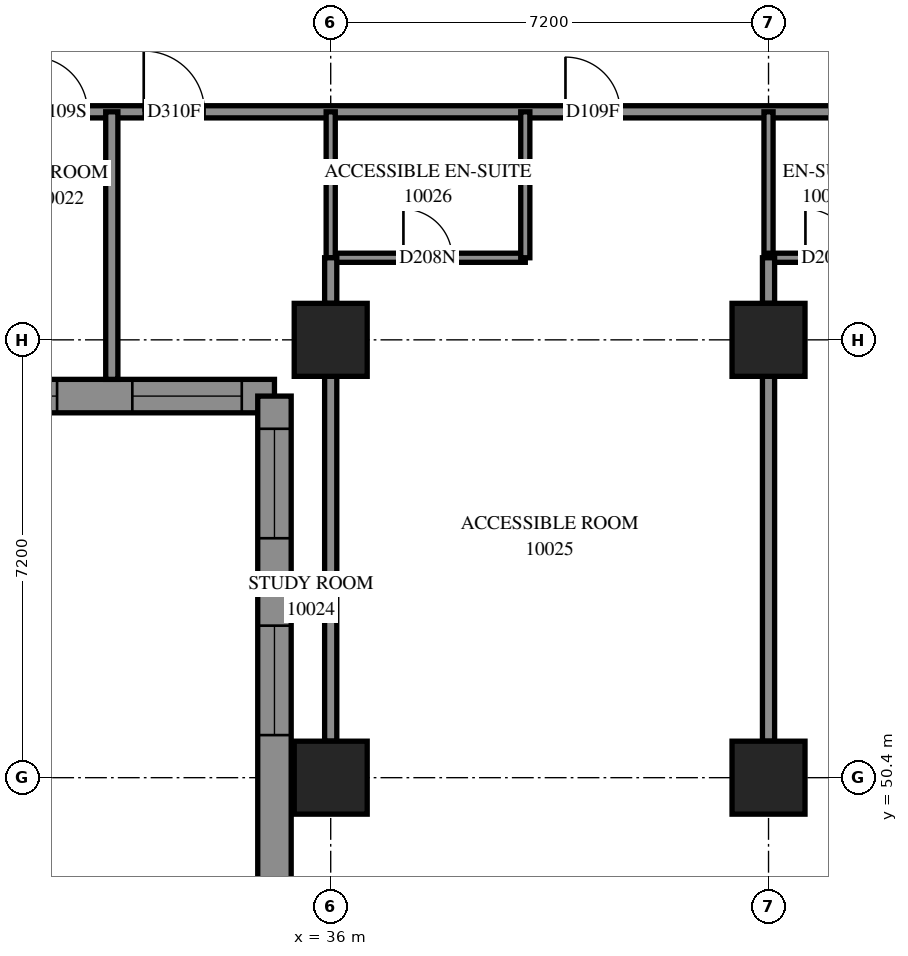
"""IFC4 building model, lengths in metres.
Left out: names, types, materials, properties, quantities, classifications, styles, units other than length and angle.
Written with IfcOpenShell. Run it as: python <this file> out.ifc"""

import sys

from ifc_helpers import new_model, si_unit, direction, frame, frame_2d, origin, origin_2d, place, context, subcontext, project, spatial, polyline, rectangle, outline, extrude, element, fill, save


model = new_model("IFC4")
c1 = context("Model", 3, precision=1e-05, world=origin(), true_north=direction((0.0, 1.0)))
c2 = subcontext(c1, "Body", "Model", "MODEL_VIEW")
j1 = project(units=[si_unit("LENGTHUNIT", "METRE"), si_unit("PLANEANGLEUNIT", "RADIAN")], contexts=[c1])
p1 = place(None, origin())
s1 = spatial("IfcSite", under=j1, at=p1, CompositionType="ELEMENT")
p2 = place(p1, origin())
s2 = spatial("IfcBuilding", under=s1, at=p2, CompositionType="ELEMENT")
p3 = place(p2, frame((0.0, 0.0, 40.6)))
s3 = spatial("IfcBuildingStorey", under=s2, at=p3, CompositionType="ELEMENT", Elevation=40.6)
for number, where, z_axis, x_axis in (
    (1, (36.0, 50.4, 0.0), (0.0, 0.0, 1.0), (1.0, 0.0, 0.0)),
    (2, (36.0, 57.6, 0.0), (0.0, 0.0, 1.0), (1.0, 0.0, 0.0)),
    (3, (43.2, 50.4, 0.0), (0.0, 0.0, 1.0), (1.0, 0.0, 0.0)),
    (4, (43.2, 57.6, 0.0), (0.0, 0.0, 1.0), (1.0, 0.0, 0.0)),
):
    element("IfcColumn", number, at=place(p3, frame(where, z_axis=z_axis, x_axis=x_axis)), inside=s3, PredefinedType="COLUMN", context=c2, shape_type="SweptSolid", body=[
        extrude(rectangle(XDim=1.2, YDim=1.2, at=origin_2d()), origin(), (0.0, 0.0, 1.0), 3.1),
    ])
p4 = place(p3, frame((27.875, 56.675, 0.0), z_axis=(0.0, 0.0, 1.0), x_axis=(1.0, 0.0, 0.0)))
e5 = element("IfcWall", 5, at=p4, inside=s3, PredefinedType="SOLIDWALL", context=c2, shape_type="SweptSolid", body=[
    extrude(outline(polyline([(-0.275, -0.275), (6.925, -0.275), (7.475, 0.275), (0.275, 0.275), (-0.275, -0.275)])), origin(), (0.0, 0.0, 1.0), 3.1),
])
p5 = place(p4, frame((1.825, 0.0, 0.6)))
e6 = element("IfcOpeningElement", 6, at=p5, cuts=e5, PredefinedType="OPENING", context=c2, shape_type="SweptSolid", body=[
    extrude(rectangle(XDim=1.8, YDim=1.9, at=frame_2d((0.9, 0.95))), frame((0.0, 0.285, 0.0), z_axis=(0.0, -1.0, 0.0), x_axis=(1.0, 0.0, 0.0)), (0.0, 0.0, 1.0), 0.57),
])
p6 = place(p4, frame((4.862, 0.0, 0.6)))
e7 = element("IfcOpeningElement", 7, at=p6, cuts=e5, PredefinedType="OPENING", context=c2, shape_type="SweptSolid", body=[
    extrude(rectangle(XDim=1.8, YDim=1.9, at=frame_2d((0.9, 0.95))), frame((0.0, 0.285, 0.0), z_axis=(0.0, -1.0, 0.0), x_axis=(1.0, 0.0, 0.0)), (0.0, 0.0, 1.0), 0.57),
])
p7 = place(p3, frame((35.075, 56.675, 0.0), z_axis=(0.0, 0.0, 1.0), x_axis=(0.0, -1.0, 0.0)))
e8 = element("IfcWall", 8, at=p7, inside=s3, PredefinedType="SOLIDWALL", context=c2, shape_type="SweptSolid", body=[
    extrude(outline(polyline([(0.275, -0.275), (8.496, -0.275), (7.946, 0.275), (-0.275, 0.275), (0.275, -0.275)])), origin(), (0.0, 0.0, 1.0), 2.6),
])
p8 = place(p7, frame((0.537, 0.0, 0.6)))
e9 = element("IfcOpeningElement", 9, at=p8, cuts=e8, PredefinedType="OPENING", context=c2, shape_type="SweptSolid", body=[
    extrude(rectangle(XDim=1.8, YDim=1.9, at=frame_2d((0.9, 0.95))), frame((0.0, 0.285, 0.0), z_axis=(0.0, -1.0, 0.0), x_axis=(1.0, 0.0, 0.0)), (0.0, 0.0, 1.0), 0.57),
])
p9 = place(p7, frame((3.775, 0.0, 0.6)))
e10 = element("IfcOpeningElement", 10, at=p9, cuts=e8, PredefinedType="OPENING", context=c2, shape_type="SweptSolid", body=[
    extrude(rectangle(XDim=1.8, YDim=1.9, at=frame_2d((0.9, 0.95))), frame((0.0, 0.285, 0.0), z_axis=(0.0, -1.0, 0.0), x_axis=(1.0, 0.0, 0.0)), (0.0, 0.0, 1.0), 0.57),
])
p10 = place(p3, frame((28.8, 61.35, 0.0), z_axis=(0.0, 0.0, 1.0), x_axis=(1.0, 0.0, 0.0)))
e11 = element("IfcWall", 11, at=p10, inside=s3, PredefinedType="PARTITIONING", context=c2, shape_type="SweptSolid", body=[
    extrude(rectangle(XDim=24.15, YDim=0.2, at=frame_2d((12.075, 0.0))), origin(), (0.0, 0.0, 1.0), 3.1),
])
p11 = place(p10, frame((2.3, 0.0, 0.0)))
e12 = element("IfcOpeningElement", 12, at=p11, cuts=e11, PredefinedType="OPENING", context=c2, shape_type="SweptSolid", body=[
    extrude(rectangle(XDim=0.9, YDim=2.1, at=frame_2d((0.45, 1.05))), frame((0.0, 0.11, 0.0), z_axis=(0.0, -1.0, 0.0), x_axis=(1.0, 0.0, 0.0)), (0.0, 0.0, 1.0), 0.22),
])
p12 = place(p10, frame((4.125, 0.0, 0.0)))
e13 = element("IfcOpeningElement", 13, at=p12, cuts=e11, PredefinedType="OPENING", context=c2, shape_type="SweptSolid", body=[
    extrude(rectangle(XDim=1.0, YDim=2.1, at=frame_2d((0.5, 1.05))), frame((0.0, 0.11, 0.0), z_axis=(0.0, -1.0, 0.0), x_axis=(1.0, 0.0, 0.0)), (0.0, 0.0, 1.0), 0.22),
])
p13 = place(p10, frame((11.061, 0.0, 0.0)))
e14 = element("IfcOpeningElement", 14, at=p13, cuts=e11, PredefinedType="OPENING", context=c2, shape_type="SweptSolid", body=[
    extrude(rectangle(XDim=0.9, YDim=2.1, at=frame_2d((0.45, 1.05))), frame((0.0, 0.11, 0.0), z_axis=(0.0, -1.0, 0.0), x_axis=(1.0, 0.0, 0.0)), (0.0, 0.0, 1.0), 0.22),
])
p14 = place(p10, frame((16.7, 0.0, 0.0)))
e15 = element("IfcOpeningElement", 15, at=p14, cuts=e11, PredefinedType="OPENING", context=c2, shape_type="SweptSolid", body=[
    extrude(rectangle(XDim=0.9, YDim=2.1, at=frame_2d((0.45, 1.05))), frame((0.0, 0.11, 0.0), z_axis=(0.0, -1.0, 0.0), x_axis=(1.0, 0.0, 0.0)), (0.0, 0.0, 1.0), 0.22),
])
p15 = place(p10, frame((18.508, 0.0, 0.0)))
e16 = element("IfcOpeningElement", 16, at=p15, cuts=e11, PredefinedType="OPENING", context=c2, shape_type="SweptSolid", body=[
    extrude(rectangle(XDim=1.0, YDim=2.1, at=frame_2d((0.5, 1.05))), frame((0.0, 0.11, 0.0), z_axis=(0.0, -1.0, 0.0), x_axis=(1.0, 0.0, 0.0)), (0.0, 0.0, 1.0), 0.22),
])
p16 = place(p10, frame((22.882, 0.0, 0.0)))
e17 = element("IfcOpeningElement", 17, at=p16, cuts=e11, PredefinedType="OPENING", context=c2, shape_type="SweptSolid", body=[
    extrude(rectangle(XDim=1.0, YDim=2.1, at=frame_2d((0.5, 1.05))), frame((0.0, 0.11, 0.0), z_axis=(0.0, -1.0, 0.0), x_axis=(1.0, 0.0, 0.0)), (0.0, 0.0, 1.0), 0.22),
])
p17 = place(p3, frame((36.0, 51.0, 0.0), z_axis=(0.0, 0.0, 1.0), x_axis=(0.0, 1.0, 0.0)))
e18 = element("IfcWall", 18, at=p17, inside=s3, PredefinedType="PARTITIONING", context=c2, shape_type="SweptSolid", body=[
    extrude(rectangle(XDim=6.0, YDim=0.2, at=frame_2d((3.0, 0.0))), origin(), (0.0, 0.0, 1.0), 2.6),
])
p18 = place(p3, frame((43.2, 51.0, 0.0), z_axis=(0.0, 0.0, 1.0), x_axis=(0.0, 1.0, 0.0)))
e19 = element("IfcWall", 19, at=p18, inside=s3, PredefinedType="PARTITIONING", context=c2, shape_type="SweptSolid", body=[
    extrude(rectangle(XDim=6.0, YDim=0.2, at=frame_2d((3.0, 0.0))), origin(), (0.0, 0.0, 1.0), 3.1),
])
p19 = place(p3, frame((32.4, 56.95, 0.0), z_axis=(0.0, 0.0, 1.0), x_axis=(0.0, 1.0, 0.0)))
e20 = element("IfcWall", 20, at=p19, inside=s3, PredefinedType="PARTITIONING", context=c2, shape_type="SweptSolid", body=[
    extrude(rectangle(XDim=4.4, YDim=0.2, at=frame_2d((2.2, 0.0))), origin(), (0.0, 0.0, 1.0), 3.1),
])
p20 = place(p3, frame((36.0, 58.95, 0.0), z_axis=(0.0, 0.0, 1.0), x_axis=(1.0, 0.0, 0.0)))
e21 = element("IfcWall", 21, at=p20, inside=s3, PredefinedType="PARTITIONING", context=c2, shape_type="SweptSolid", body=[
    extrude(rectangle(XDim=3.2, YDim=0.15, at=frame_2d((1.6, 0.0))), origin(), (0.0, 0.0, 1.0), 3.1),
])
p21 = place(p20, frame((1.196, 0.0, 0.0)))
e22 = element("IfcOpeningElement", 22, at=p21, cuts=e21, PredefinedType="OPENING", context=c2, shape_type="SweptSolid", body=[
    extrude(rectangle(XDim=0.8, YDim=2.1, at=frame_2d((0.4, 1.05))), frame((0.0, 0.085, 0.0), z_axis=(0.0, -1.0, 0.0), x_axis=(1.0, 0.0, 0.0)), (0.0, 0.0, 1.0), 0.17),
])
for number, where, z_axis, x_axis in (
    (23, (39.2, 58.95, 0.0), (0.0, 0.0, 1.0), (0.0, 1.0, 0.0)),
    (24, (36.0, 58.95, 0.0), (0.0, 0.0, 1.0), (0.0, 1.0, 0.0)),
    (25, (43.2, 58.95, 0.0), (0.0, 0.0, 1.0), (0.0, 1.0, 0.0)),
):
    element("IfcWall", number, at=place(p3, frame(where, z_axis=z_axis, x_axis=x_axis)), inside=s3, PredefinedType="PARTITIONING", context=c2, shape_type="SweptSolid", body=[
        extrude(rectangle(XDim=2.4, YDim=0.15, at=frame_2d((1.2, 0.0))), origin(), (0.0, 0.0, 1.0), 3.1),
    ])
p22 = place(p3, frame((43.2, 58.95, 0.0), z_axis=(0.0, 0.0, 1.0), x_axis=(1.0, 0.0, 0.0)))
e26 = element("IfcWall", 26, at=p22, inside=s3, PredefinedType="PARTITIONING", context=c2, shape_type="SweptSolid", body=[
    extrude(rectangle(XDim=1.9, YDim=0.15, at=frame_2d((0.95, 0.0))), origin(), (0.0, 0.0, 1.0), 3.1),
])
p23 = place(p22, frame((0.607, 0.0, 0.0)))
e27 = element("IfcOpeningElement", 27, at=p23, cuts=e26, PredefinedType="OPENING", context=c2, shape_type="SweptSolid", body=[
    extrude(rectangle(XDim=0.8, YDim=2.1, at=frame_2d((0.4, 1.05))), frame((0.0, 0.085, 0.0), z_axis=(0.0, -1.0, 0.0), x_axis=(1.0, 0.0, 0.0)), (0.0, 0.0, 1.0), 0.17),
])
for number, where, z_axis, x_axis in (
    (28, (36.0, 58.2, 0.0), (0.0, 0.0, 1.0), (0.0, 1.0, 0.0)),
    (29, (43.2, 58.2, 0.0), (0.0, 0.0, 1.0), (0.0, 1.0, 0.0)),
):
    element("IfcWall", number, at=place(p3, frame(where, z_axis=z_axis, x_axis=x_axis)), inside=s3, PredefinedType="PARTITIONING", context=c2, shape_type="SweptSolid", body=[
        extrude(rectangle(XDim=0.75, YDim=0.2, at=frame_2d((0.375, 0.0))), origin(), (0.0, 0.0, 1.0), 3.1),
    ])
p24 = place(p5, origin())
e30 = element("IfcWindow", 30, at=p24, inside=s3, PartitioningType="SINGLE_PANEL", PredefinedType="WINDOW", context=c2, shape_type="SweptSolid", body=[
    extrude(rectangle(XDim=1.8, YDim=1.9, at=frame_2d((0.9, 0.95))), frame((0.0, 0.155, 0.0), z_axis=(0.0, -1.0, 0.0), x_axis=(1.0, 0.0, 0.0)), (0.0, 0.0, 1.0), 0.06),
])
fill(e6, e30)
p25 = place(p6, origin())
e31 = element("IfcWindow", 31, at=p25, inside=s3, PartitioningType="SINGLE_PANEL", PredefinedType="WINDOW", context=c2, shape_type="SweptSolid", body=[
    extrude(rectangle(XDim=1.8, YDim=1.9, at=frame_2d((0.9, 0.95))), frame((0.0, 0.155, 0.0), z_axis=(0.0, -1.0, 0.0), x_axis=(1.0, 0.0, 0.0)), (0.0, 0.0, 1.0), 0.06),
])
fill(e7, e31)
p26 = place(p8, origin())
e32 = element("IfcWindow", 32, at=p26, inside=s3, PartitioningType="SINGLE_PANEL", PredefinedType="WINDOW", context=c2, shape_type="SweptSolid", body=[
    extrude(rectangle(XDim=1.8, YDim=1.9, at=frame_2d((0.9, 0.95))), frame((0.0, 0.155, 0.0), z_axis=(0.0, -1.0, 0.0), x_axis=(1.0, 0.0, 0.0)), (0.0, 0.0, 1.0), 0.06),
])
fill(e9, e32)
p27 = place(p9, origin())
e33 = element("IfcWindow", 33, at=p27, inside=s3, PartitioningType="SINGLE_PANEL", PredefinedType="WINDOW", context=c2, shape_type="SweptSolid", body=[
    extrude(rectangle(XDim=1.8, YDim=1.9, at=frame_2d((0.9, 0.95))), frame((0.0, 0.155, 0.0), z_axis=(0.0, -1.0, 0.0), x_axis=(1.0, 0.0, 0.0)), (0.0, 0.0, 1.0), 0.06),
])
fill(e10, e33)
p28 = place(p11, origin())
e34 = element("IfcDoor", 34, at=p28, inside=s3, OperationType="SINGLE_SWING_LEFT", PredefinedType="DOOR", context=c2, shape_type="SweptSolid", body=[
    extrude(rectangle(XDim=0.9, YDim=2.1, at=frame_2d((0.45, 1.05))), frame((0.0, 0.025, 0.0), z_axis=(0.0, -1.0, 0.0), x_axis=(1.0, 0.0, 0.0)), (0.0, 0.0, 1.0), 0.05),
])
fill(e12, e34)
p29 = place(p12, origin())
e35 = element("IfcDoor", 35, at=p29, inside=s3, OperationType="SINGLE_SWING_RIGHT", PredefinedType="DOOR", context=c2, shape_type="SweptSolid", body=[
    extrude(rectangle(XDim=1.0, YDim=2.1, at=frame_2d((0.5, 1.05))), frame((0.0, 0.025, 0.0), z_axis=(0.0, -1.0, 0.0), x_axis=(1.0, 0.0, 0.0)), (0.0, 0.0, 1.0), 0.05),
])
fill(e13, e35)
p30 = place(p13, origin())
e36 = element("IfcDoor", 36, at=p30, inside=s3, OperationType="SINGLE_SWING_LEFT", PredefinedType="DOOR", context=c2, shape_type="SweptSolid", body=[
    extrude(rectangle(XDim=0.9, YDim=2.1, at=frame_2d((0.45, 1.05))), frame((0.0, 0.025, 0.0), z_axis=(0.0, -1.0, 0.0), x_axis=(1.0, 0.0, 0.0)), (0.0, 0.0, 1.0), 0.05),
])
fill(e14, e36)
p31 = place(p21, origin())
e37 = element("IfcDoor", 37, at=p31, inside=s3, OperationType="SINGLE_SWING_RIGHT", PredefinedType="DOOR", context=c2, shape_type="SweptSolid", body=[
    extrude(rectangle(XDim=0.8, YDim=2.1, at=frame_2d((0.4, 1.05))), frame((0.0, 0.025, 0.0), z_axis=(0.0, -1.0, 0.0), x_axis=(1.0, 0.0, 0.0)), (0.0, 0.0, 1.0), 0.05),
])
fill(e22, e37)
p32 = place(p23, origin())
e38 = element("IfcDoor", 38, at=p32, inside=s3, OperationType="SINGLE_SWING_RIGHT", PredefinedType="DOOR", context=c2, shape_type="SweptSolid", body=[
    extrude(rectangle(XDim=0.8, YDim=2.1, at=frame_2d((0.4, 1.05))), frame((0.0, 0.025, 0.0), z_axis=(0.0, -1.0, 0.0), x_axis=(1.0, 0.0, 0.0)), (0.0, 0.0, 1.0), 0.05),
])
fill(e27, e38)
save(model, sys.argv[1])
